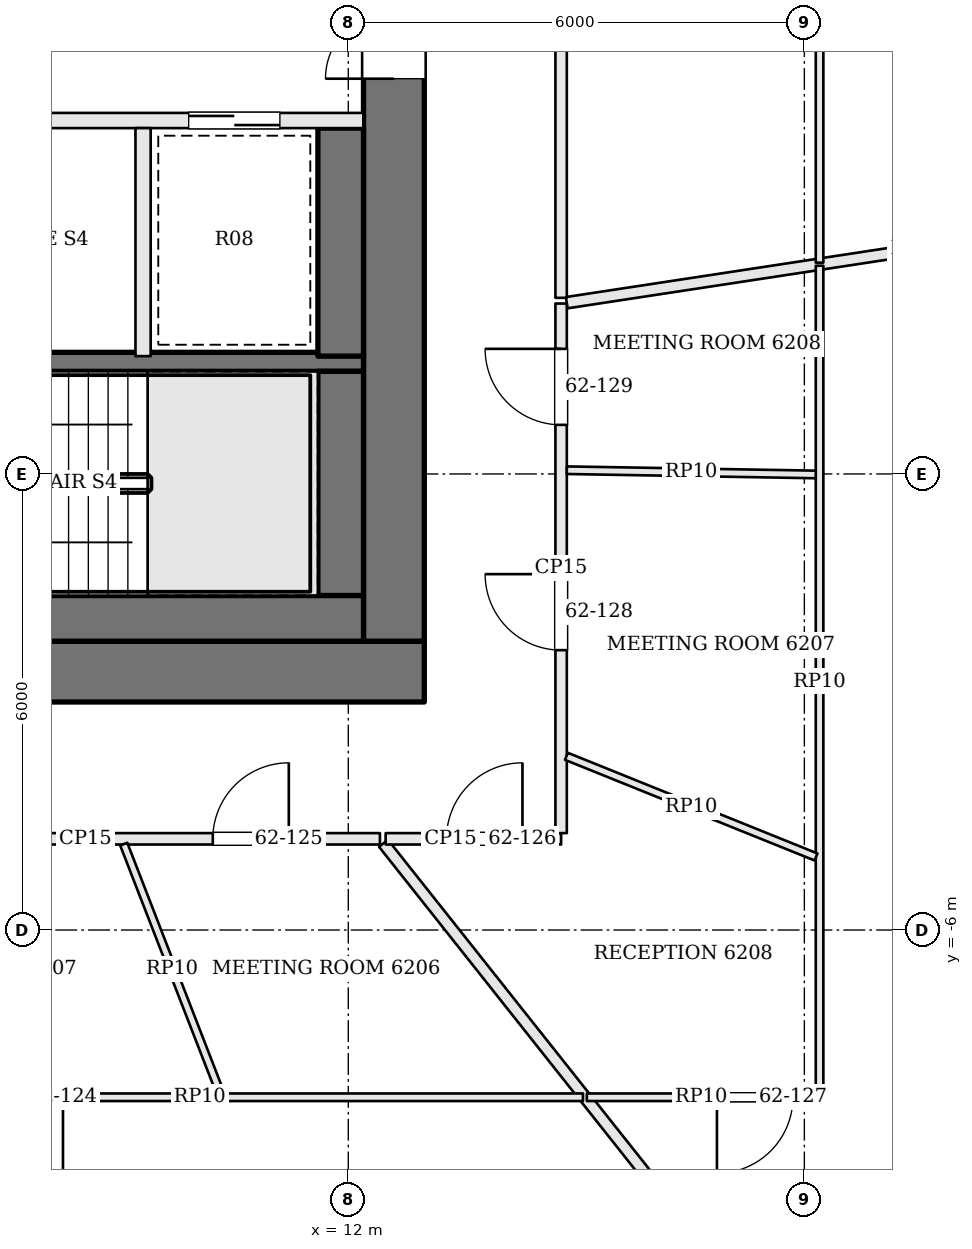
"""IFC4 building model, lengths in metres.
Left out: names, types, materials, properties, quantities, classifications, styles, units other than length and angle.
Written with IfcOpenShell. Run it as: python <this file> out.ifc"""

import sys

from ifc_helpers import new_model, si_unit, direction, frame, frame_2d, origin, place, context, subcontext, project, spatial, rectangle, extrude, element, fill, save


model = new_model("IFC4")
c1 = context("Model", 3, precision=1e-05, world=origin(), true_north=direction((0.0, 1.0)))
c2 = subcontext(c1, "Body", "Model", "MODEL_VIEW")
j1 = project(units=[si_unit("LENGTHUNIT", "METRE"), si_unit("PLANEANGLEUNIT", "RADIAN")], contexts=[c1])
p1 = place(None, origin())
s1 = spatial("IfcSite", under=j1, at=p1, CompositionType="ELEMENT")
p2 = place(p1, origin())
s2 = spatial("IfcBuilding", under=s1, at=p2, CompositionType="ELEMENT")
p3 = place(p2, frame((0.0, 0.0, 252.6)))
s3 = spatial("IfcBuildingStorey", under=s2, at=p3, CompositionType="ELEMENT", Elevation=252.6)
p4 = place(p3, frame((-13.0, -2.6, 0.0), z_axis=(0.0, 0.0, 1.0), x_axis=(1.0, 0.0, 0.0)))
e1 = element("IfcWall", 1, at=p4, inside=s3, PredefinedType="SHEAR", context=c2, shape_type="SweptSolid", body=[
    extrude(rectangle(XDim=26.0, YDim=0.8, at=frame_2d((13.0, 0.0))), origin(), (0.0, 0.0, 1.0), 3.9),
])
p5 = place(p4, frame((9.65, 0.0, 0.0)))
e2 = element("IfcOpeningElement", 2, at=p5, cuts=e1, PredefinedType="OPENING", context=c2, shape_type="SweptSolid", body=[
    extrude(rectangle(XDim=0.9, YDim=2.1, at=frame_2d((0.45, 1.05))), frame((0.0, 0.41, 0.0), z_axis=(0.0, -1.0, 0.0), x_axis=(1.0, 0.0, 0.0)), (0.0, 0.0, 1.0), 0.82),
])
p6 = place(p4, frame((12.925, 0.0, 0.0)))
e3 = element("IfcOpeningElement", 3, at=p6, cuts=e1, PredefinedType="OPENING", context=c2, shape_type="SweptSolid", body=[
    extrude(rectangle(XDim=0.9, YDim=2.1, at=frame_2d((0.45, 1.05))), frame((0.0, 0.41, 0.0), z_axis=(0.0, -1.0, 0.0), x_axis=(1.0, 0.0, 0.0)), (0.0, 0.0, 1.0), 0.82),
])
p7 = place(p4, frame((15.05, 0.0, 0.0)))
e4 = element("IfcOpeningElement", 4, at=p7, cuts=e1, PredefinedType="OPENING", context=c2, shape_type="SweptSolid", body=[
    extrude(rectangle(XDim=1.0, YDim=2.1, at=frame_2d((0.5, 1.05))), frame((0.0, 0.41, 0.0), z_axis=(0.0, -1.0, 0.0), x_axis=(1.0, 0.0, 0.0)), (0.0, 0.0, 1.0), 0.82),
])
p8 = place(p4, frame((16.825, 0.0, 0.0)))
e5 = element("IfcOpeningElement", 5, at=p8, cuts=e1, PredefinedType="OPENING", context=c2, shape_type="SweptSolid", body=[
    extrude(rectangle(XDim=0.7, YDim=2.1, at=frame_2d((0.35, 1.05))), frame((0.0, 0.41, 0.0), z_axis=(0.0, -1.0, 0.0), x_axis=(1.0, 0.0, 0.0)), (0.0, 0.0, 1.0), 0.82),
])
p9 = place(p3, frame((12.6, -2.2, 0.0), z_axis=(0.0, 0.0, 1.0), x_axis=(0.0, 1.0, 0.0)))
e6 = element("IfcWall", 6, at=p9, inside=s3, PredefinedType="SHEAR", context=c2, shape_type="SweptSolid", body=[
    extrude(rectangle(XDim=13.4, YDim=0.8, at=frame_2d((6.7, 0.0))), origin(), (0.0, 0.0, 1.0), 3.9),
])
p10 = place(p9, frame((7.4, 0.0, 0.0)))
e7 = element("IfcOpeningElement", 7, at=p10, cuts=e6, PredefinedType="OPENING", context=c2, shape_type="SweptSolid", body=[
    extrude(rectangle(XDim=1.8, YDim=2.1, at=frame_2d((0.9, 1.05))), frame((0.0, 0.41, 0.0), z_axis=(0.0, -1.0, 0.0), x_axis=(1.0, 0.0, 0.0)), (0.0, 0.0, 1.0), 0.82),
])
p11 = place(p3, frame((12.2, 4.65, 0.0), z_axis=(0.0, 0.0, 1.0), x_axis=(-1.0, 0.0, 0.0)))
e8 = element("IfcWall", 8, at=p11, inside=s3, PredefinedType="SOLIDWALL", context=c2, shape_type="SweptSolid", body=[
    extrude(rectangle(XDim=7.1, YDim=0.2, at=frame_2d((3.55, 0.0))), origin(), (0.0, 0.0, 1.0), 3.7),
])
p12 = place(p11, frame((4.4, 0.0, 0.0)))
e9 = element("IfcOpeningElement", 9, at=p12, cuts=e8, PredefinedType="OPENING", context=c2, shape_type="SweptSolid", body=[
    extrude(rectangle(XDim=1.2, YDim=2.1, at=frame_2d((0.6, 1.05))), frame((0.0, 0.11, 0.0), z_axis=(0.0, -1.0, 0.0), x_axis=(1.0, 0.0, 0.0)), (0.0, 0.0, 1.0), 0.22),
])
p13 = place(p11, frame((1.1, 0.0, 0.0)))
e10 = element("IfcOpeningElement", 10, at=p13, cuts=e8, PredefinedType="OPENING", context=c2, shape_type="SweptSolid", body=[
    extrude(rectangle(XDim=1.2, YDim=2.1, at=frame_2d((0.6, 1.05))), frame((0.0, 0.11, 0.0), z_axis=(0.0, -1.0, 0.0), x_axis=(1.0, 0.0, 0.0)), (0.0, 0.0, 1.0), 0.22),
])
p14 = place(p3, frame((12.2, 1.475, 0.0), z_axis=(0.0, 0.0, 1.0), x_axis=(-1.0, 0.0, 0.0)))
e11 = element("IfcWall", 11, at=p14, inside=s3, PredefinedType="SOLIDWALL", context=c2, shape_type="SweptSolid", body=[
    extrude(rectangle(XDim=7.1, YDim=0.25, at=frame_2d((3.55, 0.0))), origin(), (0.0, 0.0, 1.0), 3.7),
])
p15 = place(p14, frame((5.8, 0.0, 0.0)))
e12 = element("IfcOpeningElement", 12, at=p15, cuts=e11, PredefinedType="OPENING", context=c2, shape_type="SweptSolid", body=[
    extrude(rectangle(XDim=1.2, YDim=2.1, at=frame_2d((0.6, 1.05))), frame((0.0, 0.135, 0.0), z_axis=(0.0, -1.0, 0.0), x_axis=(1.0, 0.0, 0.0)), (0.0, 0.0, 1.0), 0.27),
])
p16 = place(p3, frame((9.3, 4.55, 0.0), z_axis=(0.0, 0.0, 1.0), x_axis=(0.0, -1.0, 0.0)))
e13 = element("IfcWall", 13, at=p16, inside=s3, PredefinedType="SOLIDWALL", context=c2, shape_type="SweptSolid", body=[
    extrude(rectangle(XDim=3.0, YDim=0.2, at=frame_2d((1.5, 0.0))), origin(), (0.0, 0.0, 1.0), 3.7),
])
p17 = place(p3, frame((11.9, 4.55, 0.0), z_axis=(0.0, 0.0, 1.0), x_axis=(0.0, -1.0, 0.0)))
e14 = element("IfcWall", 14, at=p17, inside=s3, PredefinedType="SOLIDWALL", context=c2, shape_type="SweptSolid", body=[
    extrude(rectangle(XDim=3.0, YDim=0.6, at=frame_2d((1.5, 0.0))), origin(), (0.0, 0.0, 1.0), 3.7),
])
p18 = place(p3, frame((11.9, 1.35, 0.0), z_axis=(0.0, 0.0, 1.0), x_axis=(0.0, -1.0, 0.0)))
e15 = element("IfcWall", 15, at=p18, inside=s3, PredefinedType="SOLIDWALL", context=c2, shape_type="SweptSolid", body=[
    extrude(rectangle(XDim=2.95, YDim=0.6, at=frame_2d((1.475, 0.0))), origin(), (0.0, 0.0, 1.0), 3.7),
])
p19 = place(p3, frame((12.2, -1.9, 0.0), z_axis=(0.0, 0.0, 1.0), x_axis=(-1.0, 0.0, 0.0)))
e16 = element("IfcWall", 16, at=p19, inside=s3, PredefinedType="SOLIDWALL", context=c2, shape_type="SweptSolid", body=[
    extrude(rectangle(XDim=7.1, YDim=0.6, at=frame_2d((3.55, 0.0))), origin(), (0.0, 0.0, 1.0), 3.7),
])
p20 = place(p3, frame((4.667, -4.8, 0.0), z_axis=(0.0, 0.0, 1.0), x_axis=(1.0, 0.0, 0.0)))
e17 = element("IfcWall", 17, at=p20, inside=s3, PredefinedType="PARTITIONING", context=c2, shape_type="SweptSolid", body=[
    extrude(rectangle(XDim=7.75, YDim=0.15, at=frame_2d((3.875, 0.0))), origin(), (0.0, 0.0, 1.0), 3.084),
])
p21 = place(p20, frame((1.239, 0.0, 0.0)))
e18 = element("IfcOpeningElement", 18, at=p21, cuts=e17, PredefinedType="OPENING", context=c2, shape_type="SweptSolid", body=[
    extrude(rectangle(XDim=1.8, YDim=2.1, at=frame_2d((0.9, 1.05))), frame((0.0, 0.085, 0.0), z_axis=(0.0, -1.0, 0.0), x_axis=(1.0, 0.0, 0.0)), (0.0, 0.0, 1.0), 0.17),
])
p22 = place(p20, frame((5.551, 0.0, 0.0)))
e19 = element("IfcOpeningElement", 19, at=p22, cuts=e17, PredefinedType="OPENING", context=c2, shape_type="SweptSolid", body=[
    extrude(rectangle(XDim=1.0, YDim=2.4, at=frame_2d((0.5, 1.2))), frame((0.0, 0.085, 0.0), z_axis=(0.0, -1.0, 0.0), x_axis=(1.0, 0.0, 0.0)), (0.0, 0.0, 1.0), 0.17),
])
p23 = place(p3, frame((20.553, -15.059, 0.0), z_axis=(0.0, 0.0, 1.0), x_axis=(-0.621387168857, 0.783503660732, 0.0)))
e20 = element("IfcWall", 20, at=p23, inside=s3, PredefinedType="PARTITIONING", context=c2, shape_type="SweptSolid", body=[
    extrude(rectangle(XDim=13.019, YDim=0.15, at=frame_2d((6.51, 0.0))), origin(), (0.0, 0.0, 1.0), 3.084),
])
p24 = place(p3, frame((12.491, -4.8, 0.0), z_axis=(0.0, 0.0, 1.0), x_axis=(1.0, 0.0, 0.0)))
e21 = element("IfcWall", 21, at=p24, inside=s3, PredefinedType="PARTITIONING", context=c2, shape_type="SweptSolid", body=[
    extrude(rectangle(XDim=2.309, YDim=0.15, at=frame_2d((1.154, 0.0))), origin(), (0.0, 0.0, 1.0), 3.084),
])
p25 = place(p24, frame((0.8, 0.0, 0.0)))
e22 = element("IfcOpeningElement", 22, at=p25, cuts=e21, PredefinedType="OPENING", context=c2, shape_type="SweptSolid", body=[
    extrude(rectangle(XDim=1.0, YDim=2.1, at=frame_2d((0.5, 1.05))), frame((0.0, 0.085, 0.0), z_axis=(0.0, -1.0, 0.0), x_axis=(1.0, 0.0, 0.0)), (0.0, 0.0, 1.0), 0.17),
])
p26 = place(p3, frame((14.8, -4.725, 0.0), z_axis=(0.0, 0.0, 1.0), x_axis=(0.0, 1.0, 0.0)))
e23 = element("IfcWall", 23, at=p26, inside=s3, PredefinedType="PARTITIONING", context=c2, shape_type="SweptSolid", body=[
    extrude(rectangle(XDim=6.967, YDim=0.15, at=frame_2d((3.483, 0.0))), origin(), (0.0, 0.0, 1.0), 3.084),
])
p27 = place(p26, frame((2.407, 0.0, 0.0)))
e24 = element("IfcOpeningElement", 24, at=p27, cuts=e23, PredefinedType="OPENING", context=c2, shape_type="SweptSolid", body=[
    extrude(rectangle(XDim=1.0, YDim=2.4, at=frame_2d((0.5, 1.2))), frame((0.0, 0.085, 0.0), z_axis=(0.0, -1.0, 0.0), x_axis=(1.0, 0.0, 0.0)), (0.0, 0.0, 1.0), 0.17),
])
p28 = place(p26, frame((5.371, 0.0, 0.0)))
e25 = element("IfcOpeningElement", 25, at=p28, cuts=e23, PredefinedType="OPENING", context=c2, shape_type="SweptSolid", body=[
    extrude(rectangle(XDim=1.0, YDim=2.4, at=frame_2d((0.5, 1.2))), frame((0.0, 0.085, 0.0), z_axis=(0.0, -1.0, 0.0), x_axis=(1.0, 0.0, 0.0)), (0.0, 0.0, 1.0), 0.17),
])
p29 = place(p3, frame((24.076, 3.654, 0.0), z_axis=(0.0, 0.0, 1.0), x_axis=(-0.988612730302, -0.150482123474, 0.0)))
e26 = element("IfcWall", 26, at=p29, inside=s3, PredefinedType="PARTITIONING", context=c2, shape_type="SweptSolid", body=[
    extrude(rectangle(XDim=9.308, YDim=0.15, at=frame_2d((4.654, 0.0))), origin(), (0.0, 0.0, 1.0), 3.084),
])
p30 = place(p3, frame((14.8, 2.317, 0.0), z_axis=(0.0, 0.0, 1.0), x_axis=(0.0, 1.0, 0.0)))
e27 = element("IfcWall", 27, at=p30, inside=s3, PredefinedType="PARTITIONING", context=c2, shape_type="SweptSolid", body=[
    extrude(rectangle(XDim=11.483, YDim=0.15, at=frame_2d((5.742, 0.0))), origin(), (0.0, 0.0, 1.0), 3.084),
])
p31 = place(p30, frame((6.341, 0.0, 0.0)))
e28 = element("IfcOpeningElement", 28, at=p31, cuts=e27, PredefinedType="OPENING", context=c2, shape_type="SweptSolid", body=[
    extrude(rectangle(XDim=1.8, YDim=2.1, at=frame_2d((0.9, 1.05))), frame((0.0, 0.085, 0.0), z_axis=(0.0, -1.0, 0.0), x_axis=(1.0, 0.0, 0.0)), (0.0, 0.0, 1.0), 0.17),
])
p32 = place(p3, frame((15.087, -8.2, 0.0), z_axis=(0.0, 0.0, 1.0), x_axis=(-1.0, 0.0, 0.0)))
e29 = element("IfcWall", 29, at=p32, inside=s3, PredefinedType="PARTITIONING", context=c2, shape_type="SweptSolid", body=[
    extrude(rectangle(XDim=10.081, YDim=0.1, at=frame_2d((5.041, 0.0))), origin(), (0.0, 0.0, 1.0), 3.084),
])
p33 = place(p32, frame((6.841, 0.0, 0.0)))
e30 = element("IfcOpeningElement", 30, at=p33, cuts=e29, PredefinedType="OPENING", context=c2, shape_type="SweptSolid", body=[
    extrude(rectangle(XDim=1.0, YDim=2.1, at=frame_2d((0.5, 1.05))), frame((0.0, 0.06, 0.0), z_axis=(0.0, -1.0, 0.0), x_axis=(1.0, 0.0, 0.0)), (0.0, 0.0, 1.0), 0.12),
])
p34 = place(p3, frame((9.046, -4.87, 0.0), z_axis=(0.0, 0.0, 1.0), x_axis=(0.361773794961, -0.93226590696, 0.0)))
e31 = element("IfcWall", 31, at=p34, inside=s3, PredefinedType="PARTITIONING", context=c2, shape_type="SweptSolid", body=[
    extrude(rectangle(XDim=3.522, YDim=0.1, at=frame_2d((1.761, 0.0))), origin(), (0.0, 0.0, 1.0), 3.084),
])
p35 = place(p3, frame((18.2, 2.74, 0.0), z_axis=(0.0, 0.0, 1.0), x_axis=(0.0, -1.0, 0.0)))
e32 = element("IfcWall", 32, at=p35, inside=s3, PredefinedType="PARTITIONING", context=c2, shape_type="SweptSolid", body=[
    extrude(rectangle(XDim=10.939, YDim=0.1, at=frame_2d((5.47, 0.0))), origin(), (0.0, 0.0, 1.0), 3.084),
])
p36 = place(p3, frame((18.15, -8.2, 0.0), z_axis=(0.0, 0.0, 1.0), x_axis=(-1.0, 0.0, 0.0)))
e33 = element("IfcWall", 33, at=p36, inside=s3, PredefinedType="PARTITIONING", context=c2, shape_type="SweptSolid", body=[
    extrude(rectangle(XDim=3.011, YDim=0.1, at=frame_2d((1.506, 0.0))), origin(), (0.0, 0.0, 1.0), 3.084),
])
p37 = place(p36, frame((0.3, 0.0, 0.0)))
e34 = element("IfcOpeningElement", 34, at=p37, cuts=e33, PredefinedType="OPENING", context=c2, shape_type="SweptSolid", body=[
    extrude(rectangle(XDim=1.0, YDim=2.1, at=frame_2d((0.5, 1.05))), frame((0.0, 0.06, 0.0), z_axis=(0.0, -1.0, 0.0), x_axis=(1.0, 0.0, 0.0)), (0.0, 0.0, 1.0), 0.12),
])
p38 = place(p3, frame((14.87, -3.715, 0.0), z_axis=(0.0, 0.0, 1.0), x_axis=(0.927460371053, -0.37392146251, 0.0)))
e35 = element("IfcWall", 35, at=p38, inside=s3, PredefinedType="PARTITIONING", context=c2, shape_type="SweptSolid", body=[
    extrude(rectangle(XDim=3.541, YDim=0.1, at=frame_2d((1.771, 0.0))), origin(), (0.0, 0.0, 1.0), 3.084),
])
p39 = place(p3, frame((14.875, 0.049, 0.0), z_axis=(0.0, 0.0, 1.0), x_axis=(0.999854310099, -0.017069228941, 0.0)))
e36 = element("IfcWall", 36, at=p39, inside=s3, PredefinedType="PARTITIONING", context=c2, shape_type="SweptSolid", body=[
    extrude(rectangle(XDim=3.275, YDim=0.1, at=frame_2d((1.638, 0.0))), origin(), (0.0, 0.0, 1.0), 3.084),
])
p40 = place(p3, frame((18.2, 14.262, 0.0), z_axis=(0.0, 0.0, 1.0), x_axis=(0.0, -1.0, 0.0)))
e37 = element("IfcWall", 37, at=p40, inside=s3, PredefinedType="PARTITIONING", context=c2, shape_type="SweptSolid", body=[
    extrude(rectangle(XDim=11.482, YDim=0.1, at=frame_2d((5.741, 0.0))), origin(), (0.0, 0.0, 1.0), 3.084),
])
p41 = place(p40, frame((7.25, 0.0, 0.0)))
e38 = element("IfcOpeningElement", 38, at=p41, cuts=e37, PredefinedType="OPENING", context=c2, shape_type="SweptSolid", body=[
    extrude(rectangle(XDim=1.0, YDim=2.1, at=frame_2d((0.5, 1.05))), frame((0.0, 0.06, 0.0), z_axis=(0.0, -1.0, 0.0), x_axis=(1.0, 0.0, 0.0)), (0.0, 0.0, 1.0), 0.12),
])
p42 = place(p10, origin())
e39 = element("IfcDoor", 39, at=p42, inside=s3, OperationType="DOUBLE_DOOR_SINGLE_SWING", PredefinedType="DOOR", context=c2, shape_type="SweptSolid", body=[
    extrude(rectangle(XDim=1.8, YDim=2.1, at=frame_2d((0.9, 1.05))), frame((0.0, 0.025, 0.0), z_axis=(0.0, -1.0, 0.0), x_axis=(1.0, 0.0, 0.0)), (0.0, 0.0, 1.0), 0.05),
])
fill(e7, e39)
p43 = place(p13, origin())
e40 = element("IfcDoor", 40, at=p43, inside=s3, OperationType="SLIDING_TO_RIGHT", PredefinedType="DOOR", context=c2, shape_type="SweptSolid", body=[
    extrude(rectangle(XDim=1.2, YDim=2.1, at=frame_2d((0.6, 1.05))), frame((0.0, 0.025, 0.0), z_axis=(0.0, -1.0, 0.0), x_axis=(1.0, 0.0, 0.0)), (0.0, 0.0, 1.0), 0.05),
])
fill(e10, e40)
p44 = place(p33, origin())
e41 = element("IfcDoor", 41, at=p44, inside=s3, OperationType="SINGLE_SWING_LEFT", PredefinedType="DOOR", context=c2, shape_type="SweptSolid", body=[
    extrude(rectangle(XDim=1.0, YDim=2.1, at=frame_2d((0.5, 1.05))), frame((0.0, 0.025, 0.0), z_axis=(0.0, -1.0, 0.0), x_axis=(1.0, 0.0, 0.0)), (0.0, 0.0, 1.0), 0.05),
])
fill(e30, e41)
p45 = place(p22, origin())
e42 = element("IfcDoor", 42, at=p45, inside=s3, OperationType="SINGLE_SWING_RIGHT", PredefinedType="DOOR", context=c2, shape_type="SweptSolid", body=[
    extrude(rectangle(XDim=1.0, YDim=2.4, at=frame_2d((0.5, 1.2))), frame((0.0, 0.025, 0.0), z_axis=(0.0, -1.0, 0.0), x_axis=(1.0, 0.0, 0.0)), (0.0, 0.0, 1.0), 0.05),
])
fill(e19, e42)
p46 = place(p25, origin())
e43 = element("IfcDoor", 43, at=p46, inside=s3, OperationType="SINGLE_SWING_RIGHT", PredefinedType="DOOR", context=c2, shape_type="SweptSolid", body=[
    extrude(rectangle(XDim=1.0, YDim=2.1, at=frame_2d((0.5, 1.05))), frame((0.0, 0.025, 0.0), z_axis=(0.0, -1.0, 0.0), x_axis=(1.0, 0.0, 0.0)), (0.0, 0.0, 1.0), 0.05),
])
fill(e22, e43)
p47 = place(p37, origin())
e44 = element("IfcDoor", 44, at=p47, inside=s3, OperationType="SINGLE_SWING_RIGHT", PredefinedType="DOOR", context=c2, shape_type="SweptSolid", body=[
    extrude(rectangle(XDim=1.0, YDim=2.1, at=frame_2d((0.5, 1.05))), frame((0.0, 0.025, 0.0), z_axis=(0.0, -1.0, 0.0), x_axis=(1.0, 0.0, 0.0)), (0.0, 0.0, 1.0), 0.05),
])
fill(e34, e44)
p48 = place(p27, origin())
e45 = element("IfcDoor", 45, at=p48, inside=s3, OperationType="SINGLE_SWING_RIGHT", PredefinedType="DOOR", context=c2, shape_type="SweptSolid", body=[
    extrude(rectangle(XDim=1.0, YDim=2.4, at=frame_2d((0.5, 1.2))), frame((0.0, 0.025, 0.0), z_axis=(0.0, -1.0, 0.0), x_axis=(1.0, 0.0, 0.0)), (0.0, 0.0, 1.0), 0.05),
])
fill(e24, e45)
p49 = place(p28, origin())
e46 = element("IfcDoor", 46, at=p49, inside=s3, OperationType="SINGLE_SWING_RIGHT", PredefinedType="DOOR", context=c2, shape_type="SweptSolid", body=[
    extrude(rectangle(XDim=1.0, YDim=2.4, at=frame_2d((0.5, 1.2))), frame((0.0, 0.025, 0.0), z_axis=(0.0, -1.0, 0.0), x_axis=(1.0, 0.0, 0.0)), (0.0, 0.0, 1.0), 0.05),
])
fill(e25, e46)
save(model, sys.argv[1])
